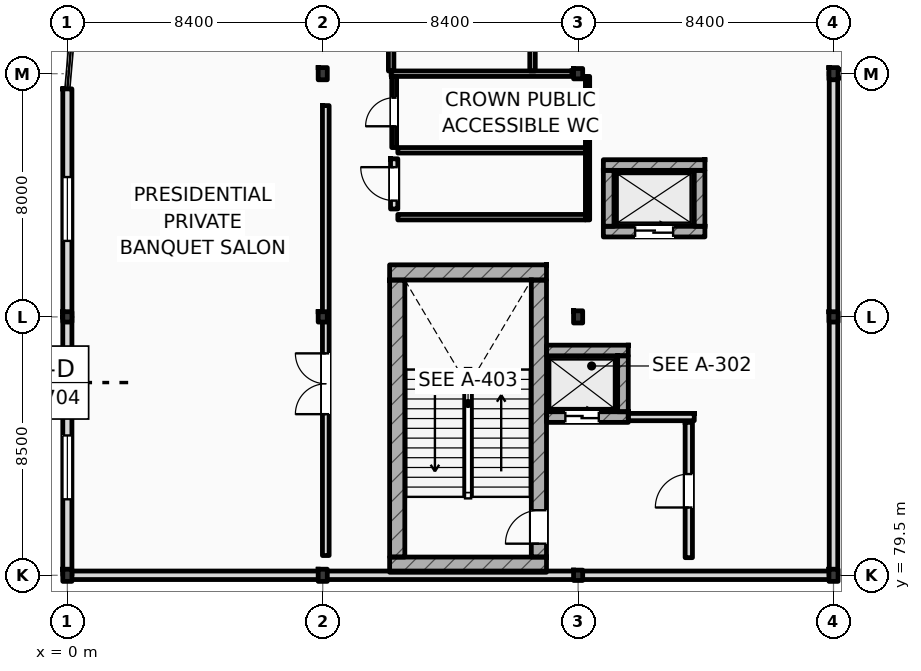
"""IFC4 building model, lengths in metres.
Left out: names, types, materials, properties, quantities, classifications, styles, units other than length and angle.
Written with IfcOpenShell. Run it as: python <this file> out.ifc"""

import sys

from ifc_helpers import new_model, si_unit, direction, frame, frame_2d, origin, origin_2d, place, context, subcontext, project, spatial, rectangle, i_section, extrude, element, fill, save


model = new_model("IFC4")
c1 = context("Model", 3, precision=1e-05, world=origin(), true_north=direction((0.0, 1.0)))
c2 = subcontext(c1, "Body", "Model", "MODEL_VIEW")
j1 = project(units=[si_unit("LENGTHUNIT", "METRE"), si_unit("PLANEANGLEUNIT", "RADIAN")], contexts=[c1])
p1 = place(None, origin())
s1 = spatial("IfcSite", under=j1, at=p1, CompositionType="ELEMENT")
p2 = place(p1, origin())
s2 = spatial("IfcBuilding", under=s1, at=p2, CompositionType="ELEMENT")
p3 = place(p2, frame((0.0, 0.0, 46.8)))
s3 = spatial("IfcBuildingStorey", under=s2, at=p3, CompositionType="ELEMENT", Elevation=46.8)
p4 = place(p3, frame((0.0, 79.5, 0.0), z_axis=(0.0, 0.0, 1.0), x_axis=(1.0, 0.0, 0.0)))
e1 = element("IfcColumn", 1, at=p4, inside=s3, PredefinedType="COLUMN", context=c2, shape_type="SweptSolid", body=[
    extrude(i_section(OverallWidth=0.3, OverallDepth=0.4, WebThickness=0.013, FlangeThickness=0.024, FilletRadius=0.027, at=origin_2d()), origin(), (0.0, 0.0, 1.0), 4.8),
])
p5 = place(p3, frame((0.0, 88.0, 0.0), z_axis=(0.0, 0.0, 1.0), x_axis=(1.0, 0.0, 0.0)))
e2 = element("IfcColumn", 2, at=p5, inside=s3, PredefinedType="COLUMN", context=c2, shape_type="SweptSolid", body=[
    extrude(i_section(OverallWidth=0.3, OverallDepth=0.34, WebThickness=0.012, FlangeThickness=0.021, FilletRadius=0.027, at=origin_2d()), origin(), (0.0, 0.0, 1.0), 4.8),
])
p6 = place(p3, frame((8.4, 79.5, 0.0), z_axis=(0.0, 0.0, 1.0), x_axis=(1.0, 0.0, 0.0)))
e3 = element("IfcColumn", 3, at=p6, inside=s3, PredefinedType="COLUMN", context=c2, shape_type="SweptSolid", body=[
    extrude(i_section(OverallWidth=0.3, OverallDepth=0.4, WebThickness=0.013, FlangeThickness=0.024, FilletRadius=0.027, at=origin_2d()), origin(), (0.0, 0.0, 1.0), 4.8),
])
p7 = place(p3, frame((8.4, 88.0, 0.0), z_axis=(0.0, 0.0, 1.0), x_axis=(1.0, 0.0, 0.0)))
e4 = element("IfcColumn", 4, at=p7, inside=s3, PredefinedType="COLUMN", context=c2, shape_type="SweptSolid", body=[
    extrude(i_section(OverallWidth=0.3, OverallDepth=0.34, WebThickness=0.012, FlangeThickness=0.021, FilletRadius=0.027, at=origin_2d()), origin(), (0.0, 0.0, 1.0), 4.8),
])
p8 = place(p3, frame((8.4, 96.0, 0.0), z_axis=(0.0, 0.0, 1.0), x_axis=(1.0, 0.0, 0.0)))
e5 = element("IfcColumn", 5, at=p8, inside=s3, PredefinedType="COLUMN", context=c2, shape_type="SweptSolid", body=[
    extrude(i_section(OverallWidth=0.3, OverallDepth=0.4, WebThickness=0.013, FlangeThickness=0.024, FilletRadius=0.027, at=origin_2d()), origin(), (0.0, 0.0, 1.0), 4.8),
])
p9 = place(p3, frame((16.8, 79.5, 0.0), z_axis=(0.0, 0.0, 1.0), x_axis=(1.0, 0.0, 0.0)))
e6 = element("IfcColumn", 6, at=p9, inside=s3, PredefinedType="COLUMN", context=c2, shape_type="SweptSolid", body=[
    extrude(i_section(OverallWidth=0.3, OverallDepth=0.34, WebThickness=0.012, FlangeThickness=0.021, FilletRadius=0.027, at=origin_2d()), origin(), (0.0, 0.0, 1.0), 4.8),
])
p10 = place(p3, frame((16.8, 88.0, 0.0), z_axis=(0.0, 0.0, 1.0), x_axis=(1.0, 0.0, 0.0)))
e7 = element("IfcColumn", 7, at=p10, inside=s3, PredefinedType="COLUMN", context=c2, shape_type="SweptSolid", body=[
    extrude(i_section(OverallWidth=0.3, OverallDepth=0.4, WebThickness=0.013, FlangeThickness=0.024, FilletRadius=0.027, at=origin_2d()), origin(), (0.0, 0.0, 1.0), 4.8),
])
p11 = place(p3, frame((16.8, 96.0, 0.0), z_axis=(0.0, 0.0, 1.0), x_axis=(1.0, 0.0, 0.0)))
e8 = element("IfcColumn", 8, at=p11, inside=s3, PredefinedType="COLUMN", context=c2, shape_type="SweptSolid", body=[
    extrude(i_section(OverallWidth=0.3, OverallDepth=0.34, WebThickness=0.012, FlangeThickness=0.021, FilletRadius=0.027, at=origin_2d()), origin(), (0.0, 0.0, 1.0), 4.8),
])
p12 = place(p3, frame((25.2, 79.5, 0.0), z_axis=(0.0, 0.0, 1.0), x_axis=(1.0, 0.0, 0.0)))
e9 = element("IfcColumn", 9, at=p12, inside=s3, PredefinedType="COLUMN", context=c2, shape_type="SweptSolid", body=[
    extrude(i_section(OverallWidth=0.3, OverallDepth=0.4, WebThickness=0.013, FlangeThickness=0.024, FilletRadius=0.027, at=origin_2d()), origin(), (0.0, 0.0, 1.0), 4.8),
])
p13 = place(p3, frame((25.2, 88.0, 0.0), z_axis=(0.0, 0.0, 1.0), x_axis=(1.0, 0.0, 0.0)))
e10 = element("IfcColumn", 10, at=p13, inside=s3, PredefinedType="COLUMN", context=c2, shape_type="SweptSolid", body=[
    extrude(i_section(OverallWidth=0.3, OverallDepth=0.34, WebThickness=0.012, FlangeThickness=0.021, FilletRadius=0.027, at=origin_2d()), origin(), (0.0, 0.0, 1.0), 4.8),
])
p14 = place(p3, frame((25.2, 96.0, 0.0), z_axis=(0.0, 0.0, 1.0), x_axis=(1.0, 0.0, 0.0)))
e11 = element("IfcColumn", 11, at=p14, inside=s3, PredefinedType="COLUMN", context=c2, shape_type="SweptSolid", body=[
    extrude(i_section(OverallWidth=0.3, OverallDepth=0.4, WebThickness=0.013, FlangeThickness=0.024, FilletRadius=0.027, at=origin_2d()), origin(), (0.0, 0.0, 1.0), 4.8),
])
for number, where, z_axis, x_axis in (
    (12, (10.6, 89.462, 0.0), (0.0, 0.0, 1.0), (1.0, 0.0, 0.0)),
    (13, (10.6, 79.85, 0.0), (0.0, 0.0, 1.0), (1.0, 0.0, 0.0)),
):
    element("IfcWall", number, at=place(p3, frame(where, z_axis=z_axis, x_axis=x_axis)), inside=s3, PredefinedType="SHEAR", context=c2, shape_type="SweptSolid", body=[
        extrude(rectangle(XDim=5.16, YDim=0.5, at=frame_2d((2.58, 0.0))), origin(), (0.0, 0.0, 1.0), 4.8),
    ])
p15 = place(p3, frame((10.85, 80.1, 0.0), z_axis=(0.0, 0.0, 1.0), x_axis=(0.0, 1.0, 0.0)))
e14 = element("IfcWall", 14, at=p15, inside=s3, PredefinedType="SHEAR", context=c2, shape_type="SweptSolid", body=[
    extrude(rectangle(XDim=9.112, YDim=0.5, at=frame_2d((4.556, 0.0))), origin(), (0.0, 0.0, 1.0), 4.8),
])
p16 = place(p3, frame((15.51, 80.1, 0.0), z_axis=(0.0, 0.0, 1.0), x_axis=(0.0, 1.0, 0.0)))
e15 = element("IfcWall", 15, at=p16, inside=s3, PredefinedType="SHEAR", context=c2, shape_type="SweptSolid", body=[
    extrude(rectangle(XDim=9.112, YDim=0.5, at=frame_2d((4.556, 0.0))), origin(), (0.0, 0.0, 1.0), 4.8),
])
p17 = place(p16, frame((0.44, 0.0, 0.0)))
e16 = element("IfcOpeningElement", 16, at=p17, cuts=e15, PredefinedType="OPENING", context=c2, shape_type="SweptSolid", body=[
    extrude(rectangle(XDim=1.1, YDim=2.2, at=frame_2d((0.55, 1.1))), frame((0.0, 0.26, 0.0), z_axis=(0.0, -1.0, 0.0), x_axis=(1.0, 0.0, 0.0)), (0.0, 0.0, 1.0), 0.52),
])
p18 = place(p3, frame((0.0, 79.5, 0.0), z_axis=(0.0, 0.0, 1.0), x_axis=(0.0, 1.0, 0.0)))
e17 = element("IfcWall", 17, at=p18, inside=s3, PredefinedType="STANDARD", context=c2, shape_type="SweptSolid", body=[
    extrude(rectangle(XDim=8.5, YDim=0.3, at=frame_2d((4.25, 0.0))), origin(), (0.0, 0.0, 1.0), 4.17),
])
p19 = place(p18, frame((2.5, 0.0, 0.95)))
e18 = element("IfcOpeningElement", 18, at=p19, cuts=e17, PredefinedType="OPENING", context=c2, shape_type="SweptSolid", body=[
    extrude(rectangle(XDim=2.1, YDim=2.2, at=frame_2d((1.05, 1.1))), frame((0.0, 0.16, 0.0), z_axis=(0.0, -1.0, 0.0), x_axis=(1.0, 0.0, 0.0)), (0.0, 0.0, 1.0), 0.32),
])
p20 = place(p3, frame((0.0, 88.0, 0.0), z_axis=(0.0, 0.0, 1.0), x_axis=(0.0, 1.0, 0.0)))
e19 = element("IfcWall", 19, at=p20, inside=s3, PredefinedType="STANDARD", context=c2, shape_type="SweptSolid", body=[
    extrude(rectangle(XDim=7.5, YDim=0.3, at=frame_2d((3.75, 0.0))), origin(), (0.0, 0.0, 1.0), 4.54),
])
p21 = place(p20, frame((2.5, 0.0, 0.95)))
e20 = element("IfcOpeningElement", 20, at=p21, cuts=e19, PredefinedType="OPENING", context=c2, shape_type="SweptSolid", body=[
    extrude(rectangle(XDim=2.1, YDim=2.2, at=frame_2d((1.05, 1.1))), frame((0.0, 0.16, 0.0), z_axis=(0.0, -1.0, 0.0), x_axis=(1.0, 0.0, 0.0)), (0.0, 0.0, 1.0), 0.32),
])
p22 = place(p3, frame((0.0, 79.5, 0.0), z_axis=(0.0, 0.0, 1.0), x_axis=(1.0, 0.0, 0.0)))
e21 = element("IfcWall", 21, at=p22, inside=s3, PredefinedType="STANDARD", context=c2, shape_type="SweptSolid", body=[
    extrude(rectangle(XDim=25.2, YDim=0.28, at=frame_2d((12.6, 0.0))), origin(), (0.0, 0.0, 1.0), 3.98),
])
p23 = place(p3, frame((25.2, 96.0, 0.0), z_axis=(0.0, 0.0, 1.0), x_axis=(1.0, 0.0, 0.0)))
e22 = element("IfcWall", 22, at=p23, inside=s3, PredefinedType="STANDARD", context=c2, shape_type="SweptSolid", body=[
    extrude(rectangle(XDim=54.6, YDim=0.28, at=frame_2d((27.3, 0.0))), origin(), (0.0, 0.0, 1.0), 4.08),
])
p24 = place(p3, frame((25.2, 79.5, 0.0), z_axis=(0.0, 0.0, 1.0), x_axis=(0.0, 1.0, 0.0)))
e23 = element("IfcWall", 23, at=p24, inside=s3, PredefinedType="STANDARD", context=c2, shape_type="SweptSolid", body=[
    extrude(rectangle(XDim=16.5, YDim=0.28, at=frame_2d((8.25, 0.0))), origin(), (0.0, 0.0, 1.0), 4.17),
])
p25 = place(p3, frame((15.76, 86.895, 0.0), z_axis=(0.0, 0.0, 1.0), x_axis=(1.0, 0.0, 0.0)))
e24 = element("IfcWall", 24, at=p25, inside=s3, PredefinedType="SHEAR", context=c2, shape_type="SweptSolid", body=[
    extrude(rectangle(XDim=2.69, YDim=0.35, at=frame_2d((1.345, 0.0))), origin(), (0.0, 0.0, 1.0), 4.54),
])
p26 = place(p3, frame((15.76, 84.705, 0.0), z_axis=(0.0, 0.0, 1.0), x_axis=(1.0, 0.0, 0.0)))
e25 = element("IfcWall", 25, at=p26, inside=s3, PredefinedType="SHEAR", context=c2, shape_type="SweptSolid", body=[
    extrude(rectangle(XDim=2.69, YDim=0.35, at=frame_2d((1.345, 0.0))), origin(), (0.0, 0.0, 1.0), 4.54),
])
p27 = place(p26, frame((0.62, 0.0, 0.0)))
e26 = element("IfcOpeningElement", 26, at=p27, cuts=e25, PredefinedType="OPENING", context=c2, shape_type="SweptSolid", body=[
    extrude(rectangle(XDim=1.1, YDim=2.2, at=frame_2d((0.55, 1.1))), frame((0.0, 0.185, 0.0), z_axis=(0.0, -1.0, 0.0), x_axis=(1.0, 0.0, 0.0)), (0.0, 0.0, 1.0), 0.37),
])
p28 = place(p3, frame((18.275, 84.88, 0.0), z_axis=(0.0, 0.0, 1.0), x_axis=(0.0, 1.0, 0.0)))
e27 = element("IfcWall", 27, at=p28, inside=s3, PredefinedType="SHEAR", context=c2, shape_type="SweptSolid", body=[
    extrude(rectangle(XDim=1.84, YDim=0.35, at=frame_2d((0.92, 0.0))), origin(), (0.0, 0.0, 1.0), 4.54),
])
p29 = place(p3, frame((17.63, 92.995, 0.0), z_axis=(0.0, 0.0, 1.0), x_axis=(1.0, 0.0, 0.0)))
e28 = element("IfcWall", 28, at=p29, inside=s3, PredefinedType="SHEAR", context=c2, shape_type="SweptSolid", body=[
    extrude(rectangle(XDim=3.34, YDim=0.35, at=frame_2d((1.67, 0.0))), origin(), (0.0, 0.0, 1.0), 4.54),
])
p30 = place(p3, frame((17.63, 90.805, 0.0), z_axis=(0.0, 0.0, 1.0), x_axis=(1.0, 0.0, 0.0)))
e29 = element("IfcWall", 29, at=p30, inside=s3, PredefinedType="SHEAR", context=c2, shape_type="SweptSolid", body=[
    extrude(rectangle(XDim=3.34, YDim=0.35, at=frame_2d((1.67, 0.0))), origin(), (0.0, 0.0, 1.0), 4.54),
])
p31 = place(p30, frame((1.045, 0.0, 0.0)))
e30 = element("IfcOpeningElement", 30, at=p31, cuts=e29, PredefinedType="OPENING", context=c2, shape_type="SweptSolid", body=[
    extrude(rectangle(XDim=1.25, YDim=2.25, at=frame_2d((0.625, 1.125))), frame((0.0, 0.185, 0.0), z_axis=(0.0, -1.0, 0.0), x_axis=(1.0, 0.0, 0.0)), (0.0, 0.0, 1.0), 0.37),
])
for number, where, z_axis, x_axis in (
    (31, (17.805, 90.98, 0.0), (0.0, 0.0, 1.0), (0.0, 1.0, 0.0)),
    (32, (20.795, 90.98, 0.0), (0.0, 0.0, 1.0), (0.0, 1.0, 0.0)),
):
    element("IfcWall", number, at=place(p3, frame(where, z_axis=z_axis, x_axis=x_axis)), inside=s3, PredefinedType="SHEAR", context=c2, shape_type="SweptSolid", body=[
        extrude(rectangle(XDim=1.84, YDim=0.35, at=frame_2d((0.92, 0.0))), origin(), (0.0, 0.0, 1.0), 4.54),
    ])
p32 = place(p3, frame((18.45, 84.705, 0.0), z_axis=(0.0, 0.0, 1.0), x_axis=(1.0, 0.0, 0.0)))
e33 = element("IfcWall", 33, at=p32, inside=s3, PredefinedType="STANDARD", context=c2, shape_type="SweptSolid", body=[
    extrude(rectangle(XDim=2.17, YDim=0.24, at=frame_2d((1.085, 0.0))), origin(), (0.0, 0.0, 1.0), 4.54),
])
p33 = place(p3, frame((20.44, 80.08, 0.0), z_axis=(0.0, 0.0, 1.0), x_axis=(0.0, 1.0, 0.0)))
e34 = element("IfcWall", 34, at=p33, inside=s3, PredefinedType="STANDARD", context=c2, shape_type="SweptSolid", body=[
    extrude(rectangle(XDim=4.45, YDim=0.24, at=frame_2d((2.225, 0.0))), origin(), (0.0, 0.0, 1.0), 4.54),
])
p34 = place(p33, frame((1.65, 0.0, 0.0)))
e35 = element("IfcOpeningElement", 35, at=p34, cuts=e34, PredefinedType="OPENING", context=c2, shape_type="SweptSolid", body=[
    extrude(rectangle(XDim=1.1, YDim=2.2, at=frame_2d((0.55, 1.1))), frame((0.0, 0.13, 0.0), z_axis=(0.0, -1.0, 0.0), x_axis=(1.0, 0.0, 0.0)), (0.0, 0.0, 1.0), 0.26),
])
p35 = place(p3, frame((8.5, 80.15, 0.0), z_axis=(0.0, 0.0, 1.0), x_axis=(0.0, 1.0, 0.0)))
e36 = element("IfcWall", 36, at=p35, inside=s3, PredefinedType="PARTITIONING", context=c2, shape_type="SweptSolid", body=[
    extrude(rectangle(XDim=14.8, YDim=0.22, at=frame_2d((7.4, 0.0))), origin(), (0.0, 0.0, 1.0), 4.17),
])
p36 = place(p35, frame((4.65, 0.0, 0.0)))
e37 = element("IfcOpeningElement", 37, at=p36, cuts=e36, PredefinedType="OPENING", context=c2, shape_type="SweptSolid", body=[
    extrude(rectangle(XDim=2.0, YDim=2.35, at=frame_2d((1.0, 1.175))), frame((0.0, 0.12, 0.0), z_axis=(0.0, -1.0, 0.0), x_axis=(1.0, 0.0, 0.0)), (0.0, 0.0, 1.0), 0.24),
])
p37 = place(p3, frame((10.75, 91.55, 0.0), z_axis=(0.0, 0.0, 1.0), x_axis=(0.0, 1.0, 0.0)))
e38 = element("IfcWall", 38, at=p37, inside=s3, PredefinedType="STANDARD", context=c2, shape_type="SweptSolid", body=[
    extrude(rectangle(XDim=1.65, YDim=0.24, at=frame_2d((0.825, 0.0))), origin(), (0.0, 0.0, 1.0), 4.54),
])
p38 = place(p37, frame((0.275, 0.0, 0.0)))
e39 = element("IfcOpeningElement", 39, at=p38, cuts=e38, PredefinedType="OPENING", context=c2, shape_type="SweptSolid", body=[
    extrude(rectangle(XDim=1.1, YDim=2.2, at=frame_2d((0.55, 1.1))), frame((0.0, 0.13, 0.0), z_axis=(0.0, -1.0, 0.0), x_axis=(1.0, 0.0, 0.0)), (0.0, 0.0, 1.0), 0.26),
])
p39 = place(p3, frame((10.75, 93.57, 0.0), z_axis=(0.0, 0.0, 1.0), x_axis=(0.0, 1.0, 0.0)))
e40 = element("IfcWall", 40, at=p39, inside=s3, PredefinedType="PARTITIONING", context=c2, shape_type="SweptSolid", body=[
    extrude(rectangle(XDim=2.34, YDim=0.16, at=frame_2d((1.17, 0.0))), origin(), (0.0, 0.0, 1.0), 4.54),
])
p40 = place(p39, frame((0.7, 0.0, 0.0)))
e41 = element("IfcOpeningElement", 41, at=p40, cuts=e40, PredefinedType="OPENING", context=c2, shape_type="SweptSolid", body=[
    extrude(rectangle(XDim=0.94, YDim=2.15, at=frame_2d((0.47, 1.075))), frame((0.0, 0.09, 0.0), z_axis=(0.0, -1.0, 0.0), x_axis=(1.0, 0.0, 0.0)), (0.0, 0.0, 1.0), 0.18),
])
for number, where, z_axis, x_axis in (
    (42, (10.87, 91.28, 0.0), (0.0, 0.0, 1.0), (1.0, 0.0, 0.0)),
    (43, (10.87, 93.48, 0.0), (0.0, 0.0, 1.0), (1.0, 0.0, 0.0)),
):
    element("IfcWall", number, at=place(p3, frame(where, z_axis=z_axis, x_axis=x_axis)), inside=s3, PredefinedType="PARTITIONING", context=c2, shape_type="SweptSolid", body=[
        extrude(rectangle(XDim=6.17, YDim=0.18, at=frame_2d((3.085, 0.0))), origin(), (0.0, 0.0, 1.0), 4.54),
    ])
p41 = place(p3, frame((17.11, 91.19, 0.0), z_axis=(0.0, 0.0, 1.0), x_axis=(0.0, 1.0, 0.0)))
e44 = element("IfcWall", 44, at=p41, inside=s3, PredefinedType="PARTITIONING", context=c2, shape_type="SweptSolid", body=[
    extrude(rectangle(XDim=4.72, YDim=0.14, at=frame_2d((2.36, 0.0))), origin(), (0.0, 0.0, 1.0), 4.54),
])
p42 = place(p3, frame((10.65, 96.0, 0.0), z_axis=(0.0, 0.0, 1.0), x_axis=(1.0, 0.0, 0.0)))
e45 = element("IfcWall", 45, at=p42, inside=s3, PredefinedType="PARTITIONING", context=c2, shape_type="SweptSolid", body=[
    extrude(rectangle(XDim=5.95, YDim=0.18, at=frame_2d((2.975, 0.0))), origin(), (0.0, 0.0, 1.0), 3.98),
])
for number, where, z_axis, x_axis in (
    (46, (10.65, 96.09, 0.0), (0.0, 0.0, 1.0), (0.0, 1.0, 0.0)),
    (47, (15.3, 96.09, 0.0), (0.0, 0.0, 1.0), (0.0, 1.0, 0.0)),
):
    element("IfcWall", number, at=place(p3, frame(where, z_axis=z_axis, x_axis=x_axis)), inside=s3, PredefinedType="PARTITIONING", context=c2, shape_type="SweptSolid", body=[
        extrude(rectangle(XDim=10.99, YDim=0.18, at=frame_2d((5.495, 0.0))), origin(), (0.0, 0.0, 1.0), 4.54),
    ])
p43 = place(p19, origin())
e48 = element("IfcWindow", 48, at=p43, inside=s3, PartitioningType="DOUBLE_PANEL_VERTICAL", PredefinedType="WINDOW", context=c2, shape_type="SweptSolid", body=[
    extrude(rectangle(XDim=2.1, YDim=2.2, at=frame_2d((1.05, 1.1))), frame((0.0, 0.03, 0.0), z_axis=(0.0, -1.0, 0.0), x_axis=(1.0, 0.0, 0.0)), (0.0, 0.0, 1.0), 0.06),
])
fill(e18, e48)
p44 = place(p21, origin())
e49 = element("IfcWindow", 49, at=p44, inside=s3, PartitioningType="DOUBLE_PANEL_VERTICAL", PredefinedType="WINDOW", context=c2, shape_type="SweptSolid", body=[
    extrude(rectangle(XDim=2.1, YDim=2.2, at=frame_2d((1.05, 1.1))), frame((0.0, 0.03, 0.0), z_axis=(0.0, -1.0, 0.0), x_axis=(1.0, 0.0, 0.0)), (0.0, 0.0, 1.0), 0.06),
])
fill(e20, e49)
p45 = place(p17, origin())
e50 = element("IfcDoor", 50, at=p45, inside=s3, OperationType="SINGLE_SWING_LEFT", PredefinedType="DOOR", context=c2, shape_type="SweptSolid", body=[
    extrude(rectangle(XDim=1.1, YDim=2.2, at=frame_2d((0.55, 1.1))), frame((0.0, 0.025, 0.0), z_axis=(0.0, -1.0, 0.0), x_axis=(1.0, 0.0, 0.0)), (0.0, 0.0, 1.0), 0.05),
])
fill(e16, e50)
p46 = place(p27, origin())
e51 = element("IfcDoor", 51, at=p46, inside=s3, OperationType="SLIDING_TO_LEFT", PredefinedType="DOOR", context=c2, shape_type="SweptSolid", body=[
    extrude(rectangle(XDim=1.1, YDim=2.2, at=frame_2d((0.55, 1.1))), frame((0.0, 0.025, 0.0), z_axis=(0.0, -1.0, 0.0), x_axis=(1.0, 0.0, 0.0)), (0.0, 0.0, 1.0), 0.05),
])
fill(e26, e51)
p47 = place(p31, origin())
e52 = element("IfcDoor", 52, at=p47, inside=s3, OperationType="SLIDING_TO_LEFT", PredefinedType="DOOR", context=c2, shape_type="SweptSolid", body=[
    extrude(rectangle(XDim=1.25, YDim=2.25, at=frame_2d((0.625, 1.125))), frame((0.0, 0.025, 0.0), z_axis=(0.0, -1.0, 0.0), x_axis=(1.0, 0.0, 0.0)), (0.0, 0.0, 1.0), 0.05),
])
fill(e30, e52)
p48 = place(p34, origin())
e53 = element("IfcDoor", 53, at=p48, inside=s3, OperationType="SINGLE_SWING_LEFT", PredefinedType="DOOR", context=c2, shape_type="SweptSolid", body=[
    extrude(rectangle(XDim=1.1, YDim=2.2, at=frame_2d((0.55, 1.1))), frame((0.0, 0.025, 0.0), z_axis=(0.0, -1.0, 0.0), x_axis=(1.0, 0.0, 0.0)), (0.0, 0.0, 1.0), 0.05),
])
fill(e35, e53)
p49 = place(p36, origin())
e54 = element("IfcDoor", 54, at=p49, inside=s3, OperationType="DOUBLE_SWING_LEFT", PredefinedType="DOOR", context=c2, shape_type="SweptSolid", body=[
    extrude(rectangle(XDim=2.0, YDim=2.35, at=frame_2d((1.0, 1.175))), frame((0.0, 0.025, 0.0), z_axis=(0.0, -1.0, 0.0), x_axis=(1.0, 0.0, 0.0)), (0.0, 0.0, 1.0), 0.05),
])
fill(e37, e54)
p50 = place(p38, origin())
e55 = element("IfcDoor", 55, at=p50, inside=s3, OperationType="SINGLE_SWING_RIGHT", PredefinedType="DOOR", context=c2, shape_type="SweptSolid", body=[
    extrude(rectangle(XDim=1.1, YDim=2.2, at=frame_2d((0.55, 1.1))), frame((0.0, 0.025, 0.0), z_axis=(0.0, -1.0, 0.0), x_axis=(1.0, 0.0, 0.0)), (0.0, 0.0, 1.0), 0.05),
])
fill(e39, e55)
p51 = place(p40, origin())
e56 = element("IfcDoor", 56, at=p51, inside=s3, OperationType="SINGLE_SWING_LEFT", PredefinedType="DOOR", context=c2, shape_type="SweptSolid", body=[
    extrude(rectangle(XDim=0.94, YDim=2.15, at=frame_2d((0.47, 1.075))), frame((0.0, 0.025, 0.0), z_axis=(0.0, -1.0, 0.0), x_axis=(1.0, 0.0, 0.0)), (0.0, 0.0, 1.0), 0.05),
])
fill(e41, e56)
save(model, sys.argv[1])
